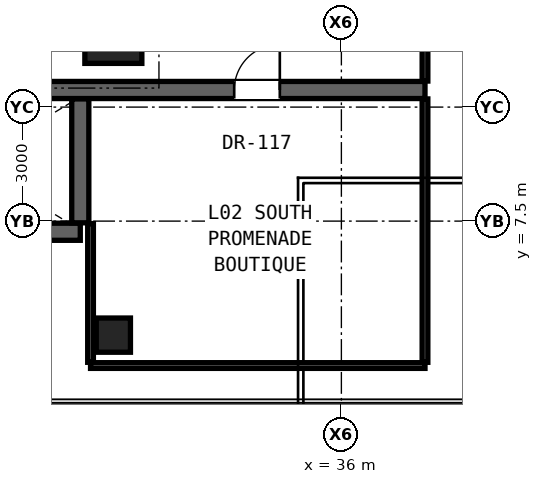
"""IFC4 building model, lengths in metres.
Left out: names, types, materials, properties, quantities, classifications, styles, units other than length and angle.
Written with IfcOpenShell. Run it as: python <this file> out.ifc"""

import sys

from ifc_helpers import new_model, si_unit, direction, frame, frame_2d, origin, origin_2d, place, context, subcontext, project, spatial, rectangle, extrude, element, fill, save


model = new_model("IFC4")
c1 = context("Model", 3, precision=1e-05, world=origin(), true_north=direction((0.0, 1.0)))
c2 = subcontext(c1, "Body", "Model", "MODEL_VIEW")
j1 = project(units=[si_unit("LENGTHUNIT", "METRE"), si_unit("PLANEANGLEUNIT", "RADIAN")], contexts=[c1])
p1 = place(None, origin())
s1 = spatial("IfcSite", under=j1, at=p1, CompositionType="ELEMENT")
p2 = place(p1, origin())
s2 = spatial("IfcBuilding", under=s1, at=p2, CompositionType="ELEMENT")
p3 = place(p2, frame((0.0, 0.0, 9.5)))
s3 = spatial("IfcBuildingStorey", under=s2, at=p3, CompositionType="ELEMENT", Elevation=9.5)
p4 = place(p3, frame((30.0, 12.4, 0.0), z_axis=(0.0, 0.0, 1.0), x_axis=(1.0, 0.0, 0.0)))
e1 = element("IfcColumn", 1, at=p4, inside=s3, PredefinedType="COLUMN", context=c2, shape_type="SweptSolid", body=[
    extrude(rectangle(XDim=1.5, YDim=1.5, at=origin_2d()), origin(), (0.0, 0.0, 1.0), 4.3),
])
p5 = place(p3, frame((30.0, 4.5, 0.0), z_axis=(0.0, 0.0, 1.0), x_axis=(1.0, 0.0, 0.0)))
e2 = element("IfcColumn", 2, at=p5, inside=s3, PredefinedType="COLUMN", context=c2, shape_type="SweptSolid", body=[
    extrude(rectangle(XDim=0.9, YDim=0.9, at=origin_2d()), origin(), (0.0, 0.0, 1.0), 4.3),
])
p6 = place(p3, frame((29.4, 3.7, 0.0), z_axis=(0.0, 0.0, 1.0), x_axis=(1.0, 0.0, 0.0)))
e3 = element("IfcWall", 3, at=p6, inside=s3, PredefinedType="PARTITIONING", context=c2, shape_type="SweptSolid", body=[
    extrude(rectangle(XDim=8.8, YDim=0.15, at=frame_2d((4.4, 0.0))), origin(), (0.0, 0.0, 1.0), 3.98),
])
p7 = place(p3, frame((21.27, 7.22, 0.0), z_axis=(0.0, 0.0, 1.0), x_axis=(1.0, 0.0, 0.0)))
e4 = element("IfcWall", 4, at=p7, inside=s3, PredefinedType="SHEAR", context=c2, shape_type="SweptSolid", body=[
    extrude(rectangle(XDim=7.86, YDim=0.45, at=frame_2d((3.93, 0.0))), origin(), (0.0, 0.0, 1.0), 3.98),
])
p8 = place(p3, frame((10.05, 10.95, 0.0), z_axis=(0.0, 0.0, 1.0), x_axis=(1.0, 0.0, 0.0)))
e5 = element("IfcWall", 5, at=p8, inside=s3, PredefinedType="SHEAR", context=c2, shape_type="SweptSolid", body=[
    extrude(rectangle(XDim=28.15, YDim=0.45, at=frame_2d((14.075, 0.0))), origin(), (0.0, 0.0, 1.0), 3.98),
])
p9 = place(p8, frame((11.72, 0.0, 0.0)))
e6 = element("IfcOpeningElement", 6, at=p9, cuts=e5, PredefinedType="OPENING", context=c2, shape_type="SweptSolid", body=[
    extrude(rectangle(XDim=1.15, YDim=2.2, at=frame_2d((0.575, 1.1))), frame((0.0, 0.235, 0.0), z_axis=(0.0, -1.0, 0.0), x_axis=(1.0, 0.0, 0.0)), (0.0, 0.0, 1.0), 0.47),
])
p10 = place(p8, frame((23.13, 0.0, 0.0)))
e7 = element("IfcOpeningElement", 7, at=p10, cuts=e5, PredefinedType="OPENING", context=c2, shape_type="SweptSolid", body=[
    extrude(rectangle(XDim=1.2, YDim=2.25, at=frame_2d((0.6, 1.125))), frame((0.0, 0.235, 0.0), z_axis=(0.0, -1.0, 0.0), x_axis=(1.0, 0.0, 0.0)), (0.0, 0.0, 1.0), 0.47),
])
p11 = place(p3, frame((29.13, 7.455, 0.0), z_axis=(0.0, 0.0, 1.0), x_axis=(0.0, 1.0, 0.0)))
e8 = element("IfcWall", 8, at=p11, inside=s3, PredefinedType="SHEAR", context=c2, shape_type="SweptSolid", body=[
    extrude(rectangle(XDim=3.26, YDim=0.45, at=frame_2d((1.63, 0.0))), origin(), (0.0, 0.0, 1.0), 3.98),
])
p12 = place(p3, frame((29.4, 3.785, 0.0), z_axis=(0.0, 0.0, 1.0), x_axis=(0.0, 1.0, 0.0)))
e9 = element("IfcWall", 9, at=p12, inside=s3, PredefinedType="PARTITIONING", context=c2, shape_type="SweptSolid", body=[
    extrude(rectangle(XDim=3.65, YDim=0.15, at=frame_2d((1.825, 0.0))), origin(), (0.0, 0.0, 1.0), 3.199),
])
p13 = place(p3, frame((38.2, 3.785, 0.0), z_axis=(0.0, 0.0, 1.0), x_axis=(0.0, 1.0, 0.0)))
e10 = element("IfcWall", 10, at=p13, inside=s3, PredefinedType="PARTITIONING", context=c2, shape_type="SweptSolid", body=[
    extrude(rectangle(XDim=6.93, YDim=0.15, at=frame_2d((3.465, 0.0))), origin(), (0.0, 0.0, 1.0), 3.199),
])
p14 = place(p3, frame((38.2, 11.185, 0.0), z_axis=(0.0, 0.0, 1.0), x_axis=(0.0, 1.0, 0.0)))
e11 = element("IfcWall", 11, at=p14, inside=s3, PredefinedType="PARTITIONING", context=c2, shape_type="SweptSolid", body=[
    extrude(rectangle(XDim=1.38, YDim=0.15, at=frame_2d((0.69, 0.0))), origin(), (0.0, 0.0, 1.0), 3.024),
])
p15 = place(p10, origin())
e12 = element("IfcDoor", 12, at=p15, inside=s3, OperationType="SINGLE_SWING_RIGHT", PredefinedType="DOOR", context=c2, shape_type="SweptSolid", body=[
    extrude(rectangle(XDim=1.2, YDim=2.25, at=frame_2d((0.6, 1.125))), frame((0.0, 0.025, 0.0), z_axis=(0.0, -1.0, 0.0), x_axis=(1.0, 0.0, 0.0)), (0.0, 0.0, 1.0), 0.05),
])
fill(e7, e12)
save(model, sys.argv[1])
